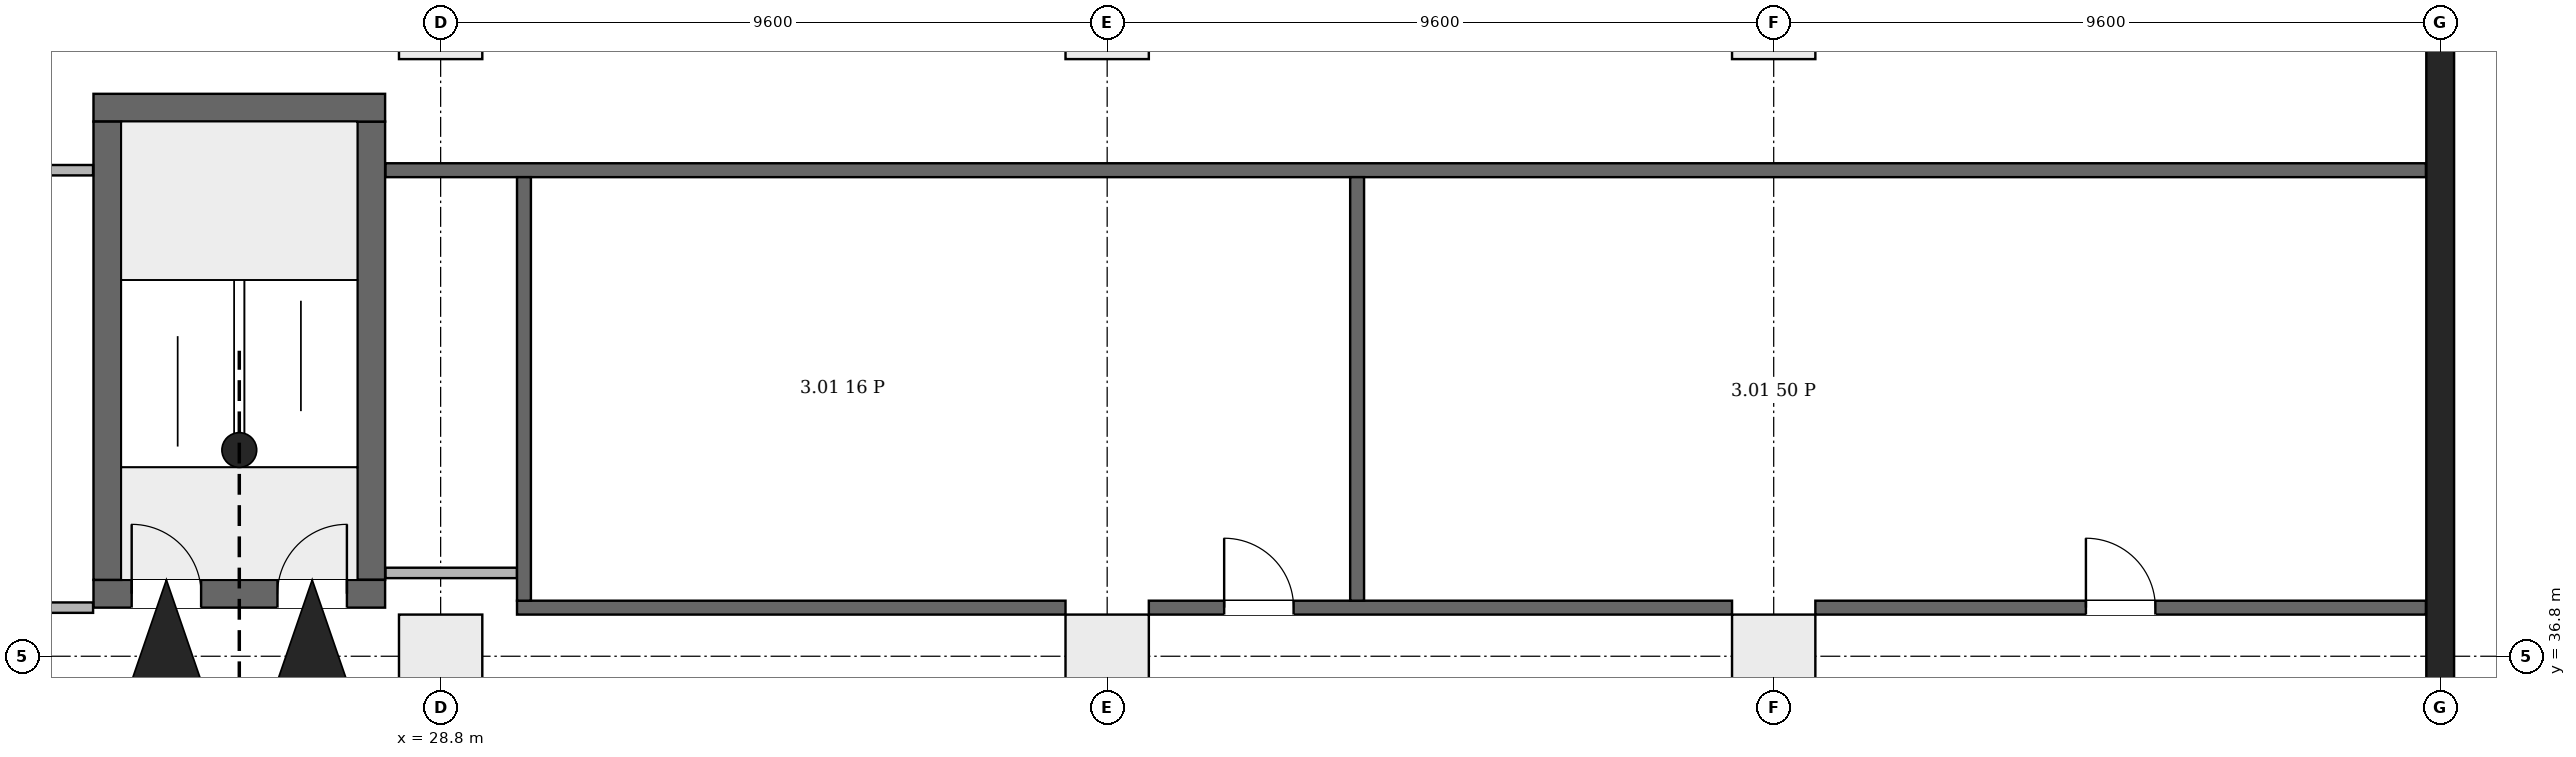
"""IFC4 building model, lengths in metres.
Left out: names, types, materials, properties, quantities, classifications, styles, units other than length and angle.
Written with IfcOpenShell. Run it as: python <this file> out.ifc"""

import sys

from ifc_helpers import new_model, si_unit, direction, frame, frame_2d, origin, origin_2d, place, context, subcontext, project, spatial, rectangle, extrude, element, fill, save


model = new_model("IFC4")
c1 = context("Model", 3, precision=1e-05, world=origin(), true_north=direction((0.0, 1.0)))
c2 = subcontext(c1, "Body", "Model", "MODEL_VIEW")
j1 = project(units=[si_unit("LENGTHUNIT", "METRE"), si_unit("PLANEANGLEUNIT", "RADIAN")], contexts=[c1])
p1 = place(None, origin())
s1 = spatial("IfcSite", under=j1, at=p1, CompositionType="ELEMENT")
p2 = place(p1, origin())
s2 = spatial("IfcBuilding", under=s1, at=p2, CompositionType="ELEMENT")
p3 = place(p2, frame((0.0, 0.0, 21.7)))
s3 = spatial("IfcBuildingStorey", under=s2, at=p3, CompositionType="ELEMENT", Elevation=21.7)
p4 = place(p3, frame((57.6, -0.2, 0.0), z_axis=(0.0, 0.0, 1.0), x_axis=(0.0, 1.0, 0.0)))
e1 = element("IfcWall", 1, at=p4, inside=s3, PredefinedType="SHEAR", context=c2, shape_type="SweptSolid", body=[
    extrude(rectangle(XDim=46.88, YDim=0.4, at=frame_2d((23.44, 0.0))), origin(), (0.0, 0.0, 1.0), 5.0),
])
p5 = place(p3, frame((23.8, 37.7, 0.0), z_axis=(0.0, 0.0, 1.0), x_axis=(1.0, 0.0, 0.0)))
e2 = element("IfcWall", 2, at=p5, inside=s3, PredefinedType="SHEAR", context=c2, shape_type="SweptSolid", body=[
    extrude(rectangle(XDim=4.2, YDim=0.4, at=frame_2d((2.1, 0.0))), origin(), (0.0, 0.0, 1.0), 5.0),
])
p6 = place(p5, frame((0.55, 0.0, 0.0)))
e3 = element("IfcOpeningElement", 3, at=p6, cuts=e2, PredefinedType="OPENING", context=c2, shape_type="SweptSolid", body=[
    extrude(rectangle(XDim=1.0, YDim=2.1, at=frame_2d((0.5, 1.05))), frame((0.0, 0.21, 0.0), z_axis=(0.0, -1.0, 0.0), x_axis=(1.0, 0.0, 0.0)), (0.0, 0.0, 1.0), 0.42),
])
p7 = place(p5, frame((2.65, 0.0, 0.0)))
e4 = element("IfcOpeningElement", 4, at=p7, cuts=e2, PredefinedType="OPENING", context=c2, shape_type="SweptSolid", body=[
    extrude(rectangle(XDim=1.0, YDim=2.1, at=frame_2d((0.5, 1.05))), frame((0.0, 0.21, 0.0), z_axis=(0.0, -1.0, 0.0), x_axis=(1.0, 0.0, 0.0)), (0.0, 0.0, 1.0), 0.42),
])
p8 = place(p3, frame((23.8, 44.7, 0.0), z_axis=(0.0, 0.0, 1.0), x_axis=(1.0, 0.0, 0.0)))
e5 = element("IfcWall", 5, at=p8, inside=s3, PredefinedType="SHEAR", context=c2, shape_type="SweptSolid", body=[
    extrude(rectangle(XDim=4.2, YDim=0.4, at=frame_2d((2.1, 0.0))), origin(), (0.0, 0.0, 1.0), 5.0),
])
for number, where, z_axis, x_axis in (
    (6, (24.0, 37.9, 0.0), (0.0, 0.0, 1.0), (0.0, 1.0, 0.0)),
    (7, (27.8, 37.9, 0.0), (0.0, 0.0, 1.0), (0.0, 1.0, 0.0)),
):
    element("IfcWall", number, at=place(p3, frame(where, z_axis=z_axis, x_axis=x_axis)), inside=s3, PredefinedType="SHEAR", context=c2, shape_type="SweptSolid", body=[
        extrude(rectangle(XDim=6.6, YDim=0.4, at=frame_2d((3.3, 0.0))), origin(), (0.0, 0.0, 1.0), 5.0),
    ])
for number, where, z_axis, x_axis in (
    (8, (28.8, 36.8, 0.0), (0.0, 0.0, 1.0), (1.0, 0.0, 0.0)),
    (9, (38.4, 36.8, 0.0), (0.0, 0.0, 1.0), (1.0, 0.0, 0.0)),
    (10, (48.0, 36.8, 0.0), (0.0, 0.0, 1.0), (1.0, 0.0, 0.0)),
    (11, (28.8, 46.0, 0.0), (0.0, 0.0, 1.0), (1.0, 0.0, 0.0)),
    (12, (38.4, 46.0, 0.0), (0.0, 0.0, 1.0), (1.0, 0.0, 0.0)),
    (13, (48.0, 46.0, 0.0), (0.0, 0.0, 1.0), (1.0, 0.0, 0.0)),
):
    element("IfcColumn", number, at=place(p3, frame(where, z_axis=z_axis, x_axis=x_axis)), inside=s3, PredefinedType="COLUMN", context=c2, shape_type="SweptSolid", body=[
        extrude(rectangle(XDim=1.2, YDim=1.2, at=origin_2d()), origin(), (0.0, 0.0, 1.0), 5.0),
    ])
p9 = place(p3, frame((8.906, 43.8, 0.0), z_axis=(0.0, 0.0, 1.0), x_axis=(1.0, 0.0, 0.0)))
e14 = element("IfcWall", 14, at=p9, inside=s3, PredefinedType="PARTITIONING", context=c2, shape_type="SweptSolid", body=[
    extrude(rectangle(XDim=14.888, YDim=0.15, at=frame_2d((7.444, 0.0))), origin(), (0.0, 0.0, 1.0), 4.65),
])
p10 = place(p9, frame((7.694, 0.0, 0.0)))
e15 = element("IfcOpeningElement", 15, at=p10, cuts=e14, PredefinedType="OPENING", context=c2, shape_type="SweptSolid", body=[
    extrude(rectangle(XDim=1.0, YDim=2.1, at=frame_2d((0.5, 1.05))), frame((0.0, 0.085, 0.0), z_axis=(0.0, -1.0, 0.0), x_axis=(1.0, 0.0, 0.0)), (0.0, 0.0, 1.0), 0.17),
])
p11 = place(p3, frame((19.125, 37.5, 0.0), z_axis=(0.0, 0.0, 1.0), x_axis=(1.0, 0.0, 0.0)))
e16 = element("IfcWall", 16, at=p11, inside=s3, PredefinedType="PARTITIONING", context=c2, shape_type="SweptSolid", body=[
    extrude(rectangle(XDim=4.669, YDim=0.15, at=frame_2d((2.334, 0.0))), origin(), (0.0, 0.0, 1.0), 4.65),
])
p12 = place(p11, frame((1.834, 0.0, 0.0)))
e17 = element("IfcOpeningElement", 17, at=p12, cuts=e16, PredefinedType="OPENING", context=c2, shape_type="SweptSolid", body=[
    extrude(rectangle(XDim=1.0, YDim=2.1, at=frame_2d((0.5, 1.05))), frame((0.0, 0.085, 0.0), z_axis=(0.0, -1.0, 0.0), x_axis=(1.0, 0.0, 0.0)), (0.0, 0.0, 1.0), 0.17),
])
p13 = place(p3, frame((28.006, 38.0, 0.0), z_axis=(0.0, 0.0, 1.0), x_axis=(1.0, 0.0, 0.0)))
e18 = element("IfcWall", 18, at=p13, inside=s3, PredefinedType="PARTITIONING", context=c2, shape_type="SweptSolid", body=[
    extrude(rectangle(XDim=1.894, YDim=0.15, at=frame_2d((0.947, 0.0))), origin(), (0.0, 0.0, 1.0), 4.65),
])
p14 = place(p3, frame((28.006, 43.8, 0.0), z_axis=(0.0, 0.0, 1.0), x_axis=(1.0, 0.0, 0.0)))
e19 = element("IfcWall", 19, at=p14, inside=s3, PredefinedType="PARTITIONING", context=c2, shape_type="SweptSolid", body=[
    extrude(rectangle(XDim=29.388, YDim=0.2, at=frame_2d((14.694, 0.0))), origin(), (0.0, 0.0, 1.0), 4.65),
])
p15 = place(p3, frame((29.9, 37.5, 0.0), z_axis=(0.0, 0.0, 1.0), x_axis=(1.0, 0.0, 0.0)))
e20 = element("IfcWall", 20, at=p15, inside=s3, PredefinedType="PARTITIONING", context=c2, shape_type="SweptSolid", body=[
    extrude(rectangle(XDim=7.9, YDim=0.2, at=frame_2d((3.95, 0.0))), origin(), (0.0, 0.0, 1.0), 4.65),
])
p16 = place(p3, frame((30.0, 37.6, 0.0), z_axis=(0.0, 0.0, 1.0), x_axis=(0.0, 1.0, 0.0)))
e21 = element("IfcWall", 21, at=p16, inside=s3, PredefinedType="PARTITIONING", context=c2, shape_type="SweptSolid", body=[
    extrude(rectangle(XDim=6.1, YDim=0.2, at=frame_2d((3.05, 0.0))), origin(), (0.0, 0.0, 1.0), 4.65),
])
p17 = place(p3, frame((39.0, 37.5, 0.0), z_axis=(0.0, 0.0, 1.0), x_axis=(1.0, 0.0, 0.0)))
e22 = element("IfcWall", 22, at=p17, inside=s3, PredefinedType="PARTITIONING", context=c2, shape_type="SweptSolid", body=[
    extrude(rectangle(XDim=8.4, YDim=0.2, at=frame_2d((4.2, 0.0))), origin(), (0.0, 0.0, 1.0), 4.65),
])
p18 = place(p17, frame((1.085, 0.0, 0.0)))
e23 = element("IfcOpeningElement", 23, at=p18, cuts=e22, PredefinedType="OPENING", context=c2, shape_type="SweptSolid", body=[
    extrude(rectangle(XDim=1.0, YDim=2.1, at=frame_2d((0.5, 1.05))), frame((0.0, 0.11, 0.0), z_axis=(0.0, -1.0, 0.0), x_axis=(1.0, 0.0, 0.0)), (0.0, 0.0, 1.0), 0.22),
])
p19 = place(p3, frame((42.0, 37.6, 0.0), z_axis=(0.0, 0.0, 1.0), x_axis=(0.0, 1.0, 0.0)))
e24 = element("IfcWall", 24, at=p19, inside=s3, PredefinedType="PARTITIONING", context=c2, shape_type="SweptSolid", body=[
    extrude(rectangle(XDim=6.1, YDim=0.2, at=frame_2d((3.05, 0.0))), origin(), (0.0, 0.0, 1.0), 4.65),
])
p20 = place(p3, frame((48.6, 37.5, 0.0), z_axis=(0.0, 0.0, 1.0), x_axis=(1.0, 0.0, 0.0)))
e25 = element("IfcWall", 25, at=p20, inside=s3, PredefinedType="PARTITIONING", context=c2, shape_type="SweptSolid", body=[
    extrude(rectangle(XDim=8.794, YDim=0.2, at=frame_2d((4.397, 0.0))), origin(), (0.0, 0.0, 1.0), 4.65),
])
p21 = place(p20, frame((3.897, 0.0, 0.0)))
e26 = element("IfcOpeningElement", 26, at=p21, cuts=e25, PredefinedType="OPENING", context=c2, shape_type="SweptSolid", body=[
    extrude(rectangle(XDim=1.0, YDim=2.1, at=frame_2d((0.5, 1.05))), frame((0.0, 0.11, 0.0), z_axis=(0.0, -1.0, 0.0), x_axis=(1.0, 0.0, 0.0)), (0.0, 0.0, 1.0), 0.22),
])
p22 = place(p6, origin())
e27 = element("IfcDoor", 27, at=p22, inside=s3, OperationType="SINGLE_SWING_RIGHT", PredefinedType="DOOR", context=c2, shape_type="SweptSolid", body=[
    extrude(rectangle(XDim=1.0, YDim=2.1, at=frame_2d((0.5, 1.05))), frame((0.0, 0.025, 0.0), z_axis=(0.0, -1.0, 0.0), x_axis=(1.0, 0.0, 0.0)), (0.0, 0.0, 1.0), 0.05),
])
fill(e3, e27)
p23 = place(p7, origin())
e28 = element("IfcDoor", 28, at=p23, inside=s3, OperationType="SINGLE_SWING_LEFT", PredefinedType="DOOR", context=c2, shape_type="SweptSolid", body=[
    extrude(rectangle(XDim=1.0, YDim=2.1, at=frame_2d((0.5, 1.05))), frame((0.0, 0.025, 0.0), z_axis=(0.0, -1.0, 0.0), x_axis=(1.0, 0.0, 0.0)), (0.0, 0.0, 1.0), 0.05),
])
fill(e4, e28)
p24 = place(p18, origin())
e29 = element("IfcDoor", 29, at=p24, inside=s3, OperationType="SINGLE_SWING_RIGHT", PredefinedType="DOOR", context=c2, shape_type="SweptSolid", body=[
    extrude(rectangle(XDim=1.0, YDim=2.1, at=frame_2d((0.5, 1.05))), frame((0.0, 0.025, 0.0), z_axis=(0.0, -1.0, 0.0), x_axis=(1.0, 0.0, 0.0)), (0.0, 0.0, 1.0), 0.05),
])
fill(e23, e29)
p25 = place(p21, origin())
e30 = element("IfcDoor", 30, at=p25, inside=s3, OperationType="SINGLE_SWING_LEFT", PredefinedType="DOOR", context=c2, shape_type="SweptSolid", body=[
    extrude(rectangle(XDim=1.0, YDim=2.1, at=frame_2d((0.5, 1.05))), frame((0.0, 0.025, 0.0), z_axis=(0.0, -1.0, 0.0), x_axis=(1.0, 0.0, 0.0)), (0.0, 0.0, 1.0), 0.05),
])
fill(e26, e30)
save(model, sys.argv[1])
